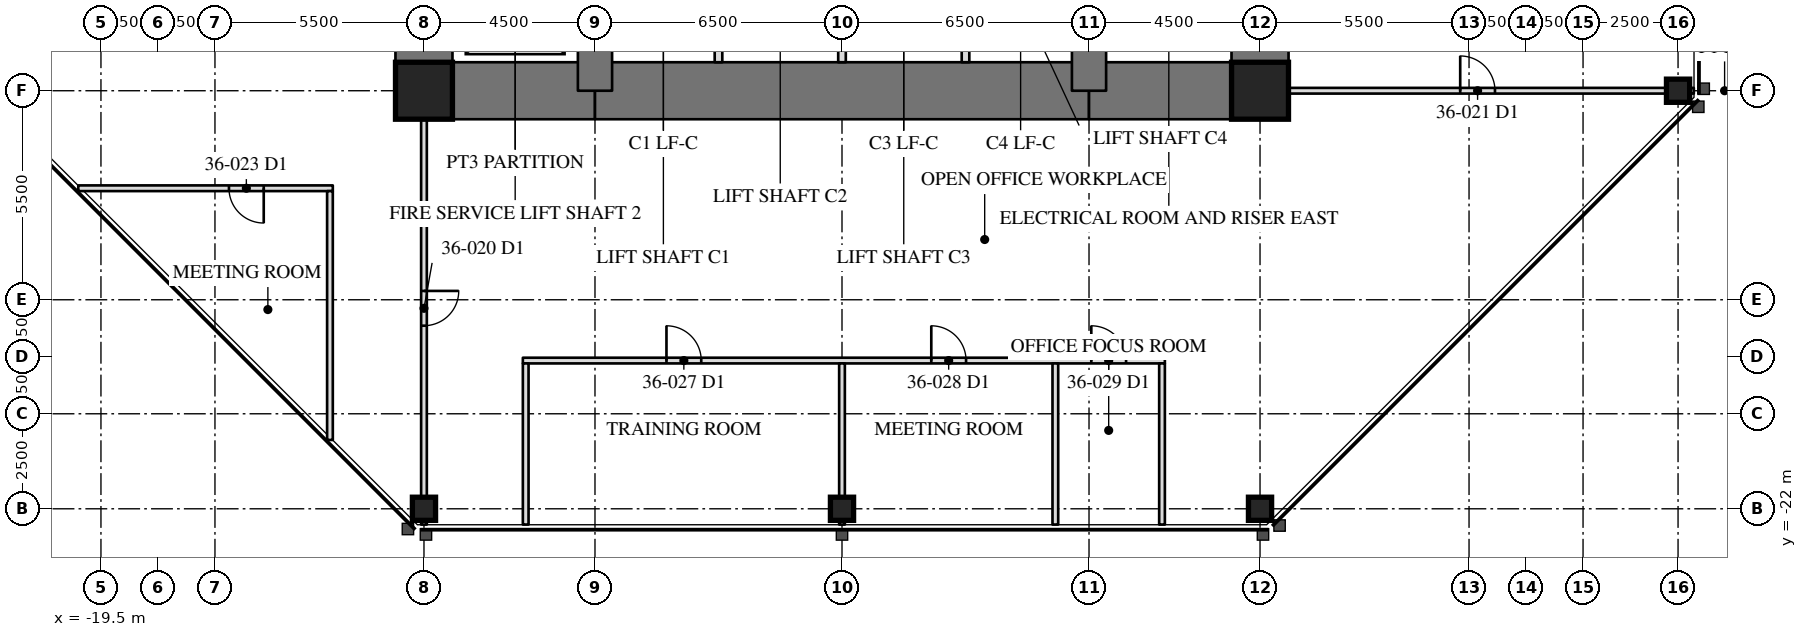
"""IFC4 building model, lengths in metres.
Left out: names, types, materials, properties, quantities, classifications, styles, units other than length and angle.
Written with IfcOpenShell. Run it as: python <this file> out.ifc"""

import sys

from ifc_helpers import new_model, si_unit, direction, frame, frame_2d, origin, origin_2d, place, context, subcontext, project, spatial, rectangle, hollow_rectangle, extrude, element, fill, save


model = new_model("IFC4")
c1 = context("Model", 3, precision=1e-05, world=origin(), true_north=direction((0.0, 1.0)))
c2 = subcontext(c1, "Body", "Model", "MODEL_VIEW")
j1 = project(units=[si_unit("LENGTHUNIT", "METRE"), si_unit("PLANEANGLEUNIT", "RADIAN")], contexts=[c1])
p1 = place(None, origin())
s1 = spatial("IfcSite", under=j1, at=p1, CompositionType="ELEMENT")
p2 = place(p1, origin())
s2 = spatial("IfcBuilding", under=s1, at=p2, CompositionType="ELEMENT")
p3 = place(p2, frame((0.0, 0.0, 154.1)))
s3 = spatial("IfcBuildingStorey", under=s2, at=p3, CompositionType="ELEMENT", Elevation=154.1)
for number, where, z_axis, x_axis in (
    (1, (-11.0, -22.0, 0.0), (0.0, 0.0, 1.0), (1.0, 0.0, 0.0)),
    (2, (0.0, -22.0, 0.0), (0.0, 0.0, 1.0), (1.0, 0.0, 0.0)),
    (3, (11.0, -22.0, 0.0), (0.0, 0.0, 1.0), (1.0, 0.0, 0.0)),
    (4, (22.0, -11.0, 0.0), (0.0, 0.0, 1.0), (0.0, 1.0, 0.0)),
):
    element("IfcColumn", number, at=place(p3, frame(where, z_axis=z_axis, x_axis=x_axis)), inside=s3, PredefinedType="COLUMN", context=c2, shape_type="SweptSolid", body=[
        extrude(hollow_rectangle(XDim=0.61, YDim=0.61, WallThickness=0.076, at=origin_2d()), origin(), (0.0, 0.0, 1.0), 4.1),
    ])
p4 = place(p3, frame((11.0, -11.0, 0.0), z_axis=(0.0, 0.0, 1.0), x_axis=(0.0, 1.0, 0.0)))
e5 = element("IfcWall", 5, at=p4, inside=s3, PredefinedType="SHEAR", context=c2, shape_type="SweptSolid", body=[
    extrude(rectangle(XDim=22.0, YDim=1.5, at=frame_2d((11.0, 0.0))), origin(), (0.0, 0.0, 1.0), 4.1),
])
p5 = place(p4, frame((15.393, 0.0, 0.0)))
e6 = element("IfcOpeningElement", 6, at=p5, cuts=e5, PredefinedType="OPENING", context=c2, shape_type="SweptSolid", body=[
    extrude(rectangle(XDim=0.915, YDim=2.134, at=frame_2d((0.458, 1.067))), frame((0.0, 0.76, 0.0), z_axis=(0.0, -1.0, 0.0), x_axis=(1.0, 0.0, 0.0)), (0.0, 0.0, 1.0), 1.52),
])
p6 = place(p3, frame((-11.0, 11.0, 0.0), z_axis=(0.0, 0.0, 1.0), x_axis=(0.0, -1.0, 0.0)))
e7 = element("IfcWall", 7, at=p6, inside=s3, PredefinedType="SHEAR", context=c2, shape_type="SweptSolid", body=[
    extrude(rectangle(XDim=22.0, YDim=1.5, at=frame_2d((11.0, 0.0))), origin(), (0.0, 0.0, 1.0), 4.1),
])
p7 = place(p6, frame((15.393, 0.0, 0.0)))
e8 = element("IfcOpeningElement", 8, at=p7, cuts=e7, PredefinedType="OPENING", context=c2, shape_type="SweptSolid", body=[
    extrude(rectangle(XDim=0.915, YDim=2.134, at=frame_2d((0.458, 1.067))), frame((0.0, 0.76, 0.0), z_axis=(0.0, -1.0, 0.0), x_axis=(1.0, 0.0, 0.0)), (0.0, 0.0, 1.0), 1.52),
])
p8 = place(p3, frame((-11.0, -11.0, 0.0), z_axis=(0.0, 0.0, 1.0), x_axis=(1.0, 0.0, 0.0)))
e9 = element("IfcWall", 9, at=p8, inside=s3, PredefinedType="SHEAR", context=c2, shape_type="SweptSolid", body=[
    extrude(rectangle(XDim=4.5, YDim=1.5, at=frame_2d((2.25, 0.0))), origin(), (0.0, 0.0, 1.0), 4.1),
])
p9 = place(p3, frame((-6.5, -11.0, 0.0), z_axis=(0.0, 0.0, 1.0), x_axis=(1.0, 0.0, 0.0)))
e10 = element("IfcWall", 10, at=p9, inside=s3, PredefinedType="SHEAR", context=c2, shape_type="SweptSolid", body=[
    extrude(rectangle(XDim=13.0, YDim=1.5, at=frame_2d((6.5, 0.0))), origin(), (0.0, 0.0, 1.0), 4.1),
])
p10 = place(p3, frame((6.5, -11.0, 0.0), z_axis=(0.0, 0.0, 1.0), x_axis=(1.0, 0.0, 0.0)))
e11 = element("IfcWall", 11, at=p10, inside=s3, PredefinedType="SHEAR", context=c2, shape_type="SweptSolid", body=[
    extrude(rectangle(XDim=4.5, YDim=1.5, at=frame_2d((2.25, 0.0))), origin(), (0.0, 0.0, 1.0), 4.1),
])
for number, where, z_axis, x_axis in (
    (12, (6.5, -11.0, 0.0), (0.0, 0.0, 1.0), (0.0, 1.0, 0.0)),
    (13, (-6.5, -6.5, 0.0), (0.0, 0.0, 1.0), (0.0, -1.0, 0.0)),
):
    element("IfcWall", number, at=place(p3, frame(where, z_axis=z_axis, x_axis=x_axis)), inside=s3, PredefinedType="SHEAR", context=c2, shape_type="SweptSolid", body=[
        extrude(rectangle(XDim=4.5, YDim=0.9, at=frame_2d((2.25, 0.0))), origin(), (0.0, 0.0, 1.0), 4.1),
    ])
for number, where, z_axis, x_axis in (
    (14, (-11.0, -11.0, 0.0), (0.0, 0.0, 1.0), (1.0, 0.0, 0.0)),
    (15, (11.0, -11.0, 0.0), (0.0, 0.0, 1.0), (1.0, 0.0, 0.0)),
):
    element("IfcColumn", number, at=place(p3, frame(where, z_axis=z_axis, x_axis=x_axis)), inside=s3, PredefinedType="COLUMN", context=c2, shape_type="SweptSolid", body=[
        extrude(hollow_rectangle(XDim=1.499, YDim=1.499, WallThickness=0.102, at=origin_2d()), origin(), (0.0, 0.0, 1.0), 4.1),
    ])
for number, where, z_axis, x_axis in (
    (16, (-3.25, -10.25, 0.0), (0.0, 0.0, 1.0), (0.0, 1.0, 0.0)),
    (17, (0.0, -10.25, 0.0), (0.0, 0.0, 1.0), (0.0, 1.0, 0.0)),
    (18, (3.25, -10.25, 0.0), (0.0, 0.0, 1.0), (0.0, 1.0, 0.0)),
):
    element("IfcWall", number, at=place(p3, frame(where, z_axis=z_axis, x_axis=x_axis)), inside=s3, PredefinedType="PARTITIONING", context=c2, shape_type="SweptSolid", body=[
        extrude(rectangle(XDim=3.3, YDim=0.2, at=frame_2d((1.65, 0.0))), origin(), (0.0, 0.0, 1.0), 3.91),
    ])
p11 = place(p3, frame((-11.0, -11.75, 0.0), z_axis=(0.0, 0.0, 1.0), x_axis=(0.0, -1.0, 0.0)))
e19 = element("IfcWall", 19, at=p11, inside=s3, PredefinedType="PARTITIONING", context=c2, shape_type="SweptSolid", body=[
    extrude(rectangle(XDim=10.665, YDim=0.15, at=frame_2d((5.333, 0.0))), origin(), (0.0, 0.0, 1.0), 3.326),
])
p12 = place(p11, frame((4.518, 0.0, 0.0)))
e20 = element("IfcOpeningElement", 20, at=p12, cuts=e19, PredefinedType="OPENING", context=c2, shape_type="SweptSolid", body=[
    extrude(rectangle(XDim=0.915, YDim=2.134, at=frame_2d((0.458, 1.067))), frame((0.0, 0.085, 0.0), z_axis=(0.0, -1.0, 0.0), x_axis=(1.0, 0.0, 0.0)), (0.0, 0.0, 1.0), 0.17),
])
p13 = place(p3, frame((11.75, -11.0, 0.0), z_axis=(0.0, 0.0, 1.0), x_axis=(1.0, 0.0, 0.0)))
e21 = element("IfcWall", 21, at=p13, inside=s3, PredefinedType="PARTITIONING", context=c2, shape_type="SweptSolid", body=[
    extrude(rectangle(XDim=10.665, YDim=0.15, at=frame_2d((5.333, 0.0))), origin(), (0.0, 0.0, 1.0), 3.326),
])
p14 = place(p13, frame((4.518, 0.0, 0.0)))
e22 = element("IfcOpeningElement", 22, at=p14, cuts=e21, PredefinedType="OPENING", context=c2, shape_type="SweptSolid", body=[
    extrude(rectangle(XDim=0.915, YDim=2.134, at=frame_2d((0.458, 1.067))), frame((0.0, 0.085, 0.0), z_axis=(0.0, -1.0, 0.0), x_axis=(1.0, 0.0, 0.0)), (0.0, 0.0, 1.0), 0.17),
])
p15 = place(p3, frame((-13.399, -13.566, 0.0), z_axis=(0.0, 0.0, 1.0), x_axis=(-1.0, 0.0, 0.0)))
e23 = element("IfcWall", 23, at=p15, inside=s3, PredefinedType="PARTITIONING", context=c2, shape_type="SweptSolid", body=[
    extrude(rectangle(XDim=6.698, YDim=0.15, at=frame_2d((3.349, 0.0))), origin(), (0.0, 0.0, 1.0), 3.91),
])
p16 = place(p15, frame((1.817, 0.0, 0.0)))
e24 = element("IfcOpeningElement", 24, at=p16, cuts=e23, PredefinedType="OPENING", context=c2, shape_type="SweptSolid", body=[
    extrude(rectangle(XDim=0.915, YDim=2.134, at=frame_2d((0.458, 1.067))), frame((0.0, 0.085, 0.0), z_axis=(0.0, -1.0, 0.0), x_axis=(1.0, 0.0, 0.0)), (0.0, 0.0, 1.0), 0.17),
])
p17 = place(p3, frame((-13.474, -13.641, 0.0), z_axis=(0.0, 0.0, 1.0), x_axis=(0.0, -1.0, 0.0)))
e25 = element("IfcWall", 25, at=p17, inside=s3, PredefinedType="PARTITIONING", context=c2, shape_type="SweptSolid", body=[
    extrude(rectangle(XDim=6.548, YDim=0.15, at=frame_2d((3.274, 0.0))), origin(), (0.0, 0.0, 1.0), 3.91),
])
p18 = place(p3, frame((-8.398, -18.1, 0.0), z_axis=(0.0, 0.0, 1.0), x_axis=(1.0, 0.0, 0.0)))
e26 = element("IfcWall", 26, at=p18, inside=s3, PredefinedType="PARTITIONING", context=c2, shape_type="SweptSolid", body=[
    extrude(rectangle(XDim=16.894, YDim=0.15, at=frame_2d((8.447, 0.0))), origin(), (0.0, 0.0, 1.0), 3.91),
])
p19 = place(p18, frame((3.779, 0.0, 0.0)))
e27 = element("IfcOpeningElement", 27, at=p19, cuts=e26, PredefinedType="OPENING", context=c2, shape_type="SweptSolid", body=[
    extrude(rectangle(XDim=0.915, YDim=2.134, at=frame_2d((0.458, 1.067))), frame((0.0, 0.085, 0.0), z_axis=(0.0, -1.0, 0.0), x_axis=(1.0, 0.0, 0.0)), (0.0, 0.0, 1.0), 0.17),
])
p20 = place(p18, frame((10.748, 0.0, 0.0)))
e28 = element("IfcOpeningElement", 28, at=p20, cuts=e26, PredefinedType="OPENING", context=c2, shape_type="SweptSolid", body=[
    extrude(rectangle(XDim=0.915, YDim=2.134, at=frame_2d((0.458, 1.067))), frame((0.0, 0.085, 0.0), z_axis=(0.0, -1.0, 0.0), x_axis=(1.0, 0.0, 0.0)), (0.0, 0.0, 1.0), 0.17),
])
p21 = place(p18, frame((14.958, 0.0, 0.0)))
e29 = element("IfcOpeningElement", 29, at=p21, cuts=e26, PredefinedType="OPENING", context=c2, shape_type="SweptSolid", body=[
    extrude(rectangle(XDim=0.915, YDim=2.134, at=frame_2d((0.458, 1.067))), frame((0.0, 0.085, 0.0), z_axis=(0.0, -1.0, 0.0), x_axis=(1.0, 0.0, 0.0)), (0.0, 0.0, 1.0), 0.17),
])
p22 = place(p3, frame((-8.323, -18.175, 0.0), z_axis=(0.0, 0.0, 1.0), x_axis=(0.0, -1.0, 0.0)))
e30 = element("IfcWall", 30, at=p22, inside=s3, PredefinedType="PARTITIONING", context=c2, shape_type="SweptSolid", body=[
    extrude(rectangle(XDim=4.24, YDim=0.15, at=frame_2d((2.12, 0.0))), origin(), (0.0, 0.0, 1.0), 3.91),
])
p23 = place(p3, frame((0.0, -18.175, 0.0), z_axis=(0.0, 0.0, 1.0), x_axis=(0.0, -1.0, 0.0)))
e31 = element("IfcWall", 31, at=p23, inside=s3, PredefinedType="PARTITIONING", context=c2, shape_type="SweptSolid", body=[
    extrude(rectangle(XDim=4.24, YDim=0.15, at=frame_2d((2.12, 0.0))), origin(), (0.0, 0.0, 1.0), 3.326),
])
for number, where, z_axis, x_axis in (
    (32, (5.614, -18.175, 0.0), (0.0, 0.0, 1.0), (0.0, -1.0, 0.0)),
    (33, (8.421, -18.175, 0.0), (0.0, 0.0, 1.0), (0.0, -1.0, 0.0)),
):
    element("IfcWall", number, at=place(p3, frame(where, z_axis=z_axis, x_axis=x_axis)), inside=s3, PredefinedType="PARTITIONING", context=c2, shape_type="SweptSolid", body=[
        extrude(rectangle(XDim=4.24, YDim=0.15, at=frame_2d((2.12, 0.0))), origin(), (0.0, 0.0, 1.0), 3.91),
    ])
p24 = place(p12, origin())
e34 = element("IfcDoor", 34, at=p24, inside=s3, OperationType="SINGLE_SWING_LEFT", PredefinedType="DOOR", context=c2, shape_type="SweptSolid", body=[
    extrude(rectangle(XDim=0.915, YDim=2.134, at=frame_2d((0.458, 1.067))), frame((0.0, 0.025, 0.0), z_axis=(0.0, -1.0, 0.0), x_axis=(1.0, 0.0, 0.0)), (0.0, 0.0, 1.0), 0.05),
])
fill(e20, e34)
p25 = place(p14, origin())
e35 = element("IfcDoor", 35, at=p25, inside=s3, OperationType="SINGLE_SWING_LEFT", PredefinedType="DOOR", context=c2, shape_type="SweptSolid", body=[
    extrude(rectangle(XDim=0.915, YDim=2.134, at=frame_2d((0.458, 1.067))), frame((0.0, 0.025, 0.0), z_axis=(0.0, -1.0, 0.0), x_axis=(1.0, 0.0, 0.0)), (0.0, 0.0, 1.0), 0.05),
])
fill(e22, e35)
p26 = place(p16, origin())
e36 = element("IfcDoor", 36, at=p26, inside=s3, OperationType="SINGLE_SWING_LEFT", PredefinedType="DOOR", context=c2, shape_type="SweptSolid", body=[
    extrude(rectangle(XDim=0.915, YDim=2.134, at=frame_2d((0.458, 1.067))), frame((0.0, 0.025, 0.0), z_axis=(0.0, -1.0, 0.0), x_axis=(1.0, 0.0, 0.0)), (0.0, 0.0, 1.0), 0.05),
])
fill(e24, e36)
p27 = place(p19, origin())
e37 = element("IfcDoor", 37, at=p27, inside=s3, OperationType="SINGLE_SWING_LEFT", PredefinedType="DOOR", context=c2, shape_type="SweptSolid", body=[
    extrude(rectangle(XDim=0.915, YDim=2.134, at=frame_2d((0.458, 1.067))), frame((0.0, 0.025, 0.0), z_axis=(0.0, -1.0, 0.0), x_axis=(1.0, 0.0, 0.0)), (0.0, 0.0, 1.0), 0.05),
])
fill(e27, e37)
p28 = place(p20, origin())
e38 = element("IfcDoor", 38, at=p28, inside=s3, OperationType="SINGLE_SWING_LEFT", PredefinedType="DOOR", context=c2, shape_type="SweptSolid", body=[
    extrude(rectangle(XDim=0.915, YDim=2.134, at=frame_2d((0.458, 1.067))), frame((0.0, 0.025, 0.0), z_axis=(0.0, -1.0, 0.0), x_axis=(1.0, 0.0, 0.0)), (0.0, 0.0, 1.0), 0.05),
])
fill(e28, e38)
p29 = place(p21, origin())
e39 = element("IfcDoor", 39, at=p29, inside=s3, OperationType="SINGLE_SWING_LEFT", PredefinedType="DOOR", context=c2, shape_type="SweptSolid", body=[
    extrude(rectangle(XDim=0.915, YDim=2.134, at=frame_2d((0.458, 1.067))), frame((0.0, 0.025, 0.0), z_axis=(0.0, -1.0, 0.0), x_axis=(1.0, 0.0, 0.0)), (0.0, 0.0, 1.0), 0.05),
])
fill(e29, e39)
save(model, sys.argv[1])
